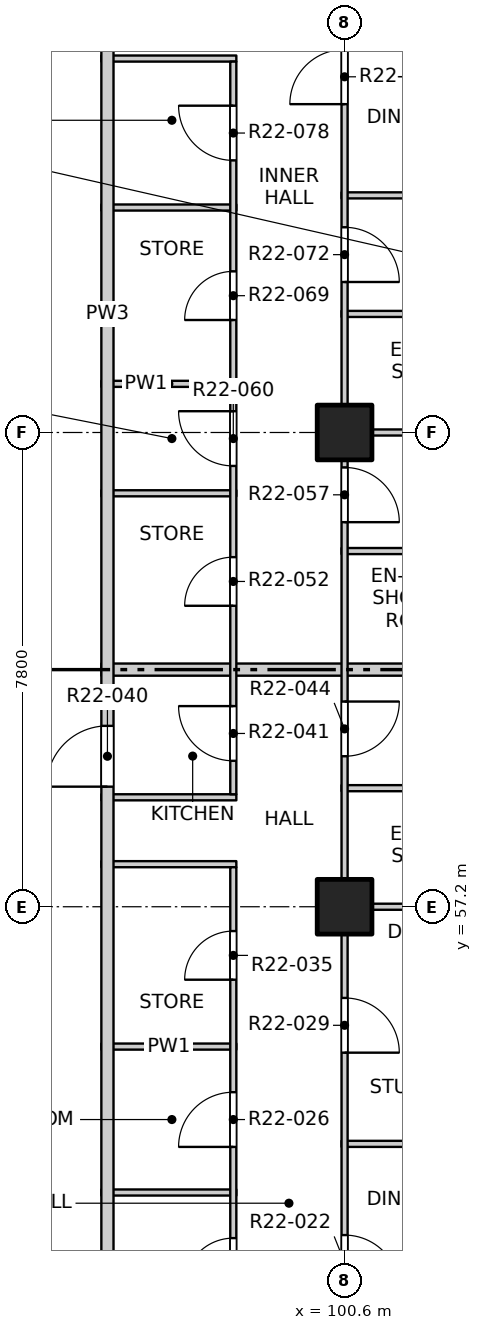
"""IFC4 building model, lengths in metres.
Left out: names, types, materials, properties, quantities, classifications, styles, units other than length and angle.
Written with IfcOpenShell. Run it as: python <this file> out.ifc"""

import sys

from ifc_helpers import new_model, si_unit, direction, frame, frame_2d, origin, origin_2d, place, context, subcontext, project, spatial, rectangle, extrude, element, fill, save


model = new_model("IFC4")
c1 = context("Model", 3, precision=1e-05, world=origin(), true_north=direction((0.0, 1.0)))
c2 = subcontext(c1, "Body", "Model", "MODEL_VIEW")
j1 = project(units=[si_unit("LENGTHUNIT", "METRE"), si_unit("PLANEANGLEUNIT", "RADIAN")], contexts=[c1])
p1 = place(None, origin())
s1 = spatial("IfcSite", under=j1, at=p1, CompositionType="ELEMENT")
p2 = place(p1, origin())
s2 = spatial("IfcBuilding", under=s1, at=p2, CompositionType="ELEMENT")
p3 = place(p2, frame((0.0, 0.0, 224.5)))
s3 = spatial("IfcBuildingStorey", under=s2, at=p3, CompositionType="ELEMENT", Elevation=224.5)
for number, where, z_axis, x_axis in (
    (1, (100.6, 57.2, -0.25), (0.0, 0.0, 1.0), (1.0, 0.0, 0.0)),
    (2, (100.6, 65.0, -0.25), (0.0, 0.0, 1.0), (1.0, 0.0, 0.0)),
):
    element("IfcColumn", number, at=place(p3, frame(where, z_axis=z_axis, x_axis=x_axis)), inside=s3, PredefinedType="COLUMN", context=c2, shape_type="SweptSolid", body=[
        extrude(rectangle(XDim=0.9, YDim=0.9, at=origin_2d()), origin(), (0.0, 0.0, 1.0), 3.4),
    ])
p4 = place(p3, frame((96.6, 52.5, 0.0), z_axis=(0.0, 0.0, 1.0), x_axis=(1.0, 0.0, 0.0)))
e3 = element("IfcWall", 3, at=p4, inside=s3, PredefinedType="PARTITIONING", context=c2, shape_type="SweptSolid", body=[
    extrude(rectangle(XDim=2.22, YDim=0.1, at=frame_2d((1.11, 0.0))), origin(), (0.0, 0.0, 1.0), 3.15),
])
p5 = place(p3, frame((100.55, 53.3, 0.0), z_axis=(0.0, 0.0, 1.0), x_axis=(1.0, 0.0, 0.0)))
e4 = element("IfcWall", 4, at=p5, inside=s3, PredefinedType="PARTITIONING", context=c2, shape_type="SweptSolid", body=[
    extrude(rectangle(XDim=7.55, YDim=0.1, at=frame_2d((3.775, 0.0))), origin(), (0.0, 0.0, 1.0), 3.15),
])
p6 = place(p3, frame((96.6, 54.9, 0.0), z_axis=(0.0, 0.0, 1.0), x_axis=(1.0, 0.0, 0.0)))
e5 = element("IfcWall", 5, at=p6, inside=s3, PredefinedType="PARTITIONING", context=c2, shape_type="SweptSolid", body=[
    extrude(rectangle(XDim=2.22, YDim=0.1, at=frame_2d((1.11, 0.0))), origin(), (0.0, 0.0, 1.0), 3.15),
])
p7 = place(p3, frame((100.55, 57.2, 0.0), z_axis=(0.0, 0.0, 1.0), x_axis=(1.0, 0.0, 0.0)))
e6 = element("IfcWall", 6, at=p7, inside=s3, PredefinedType="PARTITIONING", context=c2, shape_type="SweptSolid", body=[
    extrude(rectangle(XDim=7.55, YDim=0.1, at=frame_2d((3.775, 0.0))), origin(), (0.0, 0.0, 1.0), 3.15),
])
for number, where, z_axis, x_axis in (
    (7, (96.6, 57.9, 0.0), (0.0, 0.0, 1.0), (1.0, 0.0, 0.0)),
    (8, (96.6, 59.0, 0.0), (0.0, 0.0, 1.0), (1.0, 0.0, 0.0)),
):
    element("IfcWall", number, at=place(p3, frame(where, z_axis=z_axis, x_axis=x_axis)), inside=s3, PredefinedType="PARTITIONING", context=c2, shape_type="SweptSolid", body=[
        extrude(rectangle(XDim=2.22, YDim=0.1, at=frame_2d((1.11, 0.0))), origin(), (0.0, 0.0, 1.0), 3.15),
    ])
p8 = place(p3, frame((100.55, 59.15, 0.0), z_axis=(0.0, 0.0, 1.0), x_axis=(1.0, 0.0, 0.0)))
e9 = element("IfcWall", 9, at=p8, inside=s3, PredefinedType="PARTITIONING", context=c2, shape_type="SweptSolid", body=[
    extrude(rectangle(XDim=3.7, YDim=0.1, at=frame_2d((1.85, 0.0))), origin(), (0.0, 0.0, 1.0), 3.15),
])
p9 = place(p3, frame((96.6, 61.1, 0.0), z_axis=(0.0, 0.0, 1.0), x_axis=(1.0, 0.0, 0.0)))
e10 = element("IfcWall", 10, at=p9, inside=s3, PredefinedType="PARTITIONING", context=c2, shape_type="SweptSolid", body=[
    extrude(rectangle(XDim=11.5, YDim=0.2, at=frame_2d((5.75, 0.0))), origin(), (0.0, 0.0, 1.0), 2.55),
])
p10 = place(p3, frame((100.55, 63.05, 0.0), z_axis=(0.0, 0.0, 1.0), x_axis=(1.0, 0.0, 0.0)))
e11 = element("IfcWall", 11, at=p10, inside=s3, PredefinedType="PARTITIONING", context=c2, shape_type="SweptSolid", body=[
    extrude(rectangle(XDim=3.7, YDim=0.1, at=frame_2d((1.85, 0.0))), origin(), (0.0, 0.0, 1.0), 3.15),
])
p11 = place(p3, frame((96.6, 64.0, 0.0), z_axis=(0.0, 0.0, 1.0), x_axis=(1.0, 0.0, 0.0)))
e12 = element("IfcWall", 12, at=p11, inside=s3, PredefinedType="PARTITIONING", context=c2, shape_type="SweptSolid", body=[
    extrude(rectangle(XDim=2.22, YDim=0.1, at=frame_2d((1.11, 0.0))), origin(), (0.0, 0.0, 1.0), 3.15),
])
p12 = place(p3, frame((100.55, 65.0, 0.0), z_axis=(0.0, 0.0, 1.0), x_axis=(1.0, 0.0, 0.0)))
e13 = element("IfcWall", 13, at=p12, inside=s3, PredefinedType="PARTITIONING", context=c2, shape_type="SweptSolid", body=[
    extrude(rectangle(XDim=7.55, YDim=0.1, at=frame_2d((3.775, 0.0))), origin(), (0.0, 0.0, 1.0), 3.15),
])
p13 = place(p3, frame((96.6, 65.8, 0.0), z_axis=(0.0, 0.0, 1.0), x_axis=(1.0, 0.0, 0.0)))
e14 = element("IfcWall", 14, at=p13, inside=s3, PredefinedType="PARTITIONING", context=c2, shape_type="SweptSolid", body=[
    extrude(rectangle(XDim=2.22, YDim=0.1, at=frame_2d((1.11, 0.0))), origin(), (0.0, 0.0, 1.0), 3.15),
])
p14 = place(p3, frame((100.55, 66.95, 0.0), z_axis=(0.0, 0.0, 1.0), x_axis=(1.0, 0.0, 0.0)))
e15 = element("IfcWall", 15, at=p14, inside=s3, PredefinedType="PARTITIONING", context=c2, shape_type="SweptSolid", body=[
    extrude(rectangle(XDim=3.7, YDim=0.1, at=frame_2d((1.85, 0.0))), origin(), (0.0, 0.0, 1.0), 3.15),
])
p15 = place(p3, frame((96.6, 68.7, 0.0), z_axis=(0.0, 0.0, 1.0), x_axis=(1.0, 0.0, 0.0)))
e16 = element("IfcWall", 16, at=p15, inside=s3, PredefinedType="PARTITIONING", context=c2, shape_type="SweptSolid", body=[
    extrude(rectangle(XDim=2.22, YDim=0.1, at=frame_2d((1.11, 0.0))), origin(), (0.0, 0.0, 1.0), 2.55),
])
p16 = place(p3, frame((100.55, 68.9, 0.0), z_axis=(0.0, 0.0, 1.0), x_axis=(1.0, 0.0, 0.0)))
e17 = element("IfcWall", 17, at=p16, inside=s3, PredefinedType="PARTITIONING", context=c2, shape_type="SweptSolid", body=[
    extrude(rectangle(XDim=7.55, YDim=0.1, at=frame_2d((3.775, 0.0))), origin(), (0.0, 0.0, 1.0), 2.55),
])
p17 = place(p3, frame((96.6, 71.15, 0.0), z_axis=(0.0, 0.0, 1.0), x_axis=(1.0, 0.0, 0.0)))
e18 = element("IfcWall", 18, at=p17, inside=s3, PredefinedType="PARTITIONING", context=c2, shape_type="SweptSolid", body=[
    extrude(rectangle(XDim=2.22, YDim=0.1, at=frame_2d((1.11, 0.0))), origin(), (0.0, 0.0, 1.0), 3.15),
])
p18 = place(p3, frame((96.7, 49.5, 0.0), z_axis=(0.0, 0.0, 1.0), x_axis=(0.0, 1.0, 0.0)))
e19 = element("IfcWall", 19, at=p18, inside=s3, PredefinedType="PARTITIONING", context=c2, shape_type="SweptSolid", body=[
    extrude(rectangle(XDim=34.9, YDim=0.2, at=frame_2d((17.45, 0.0))), origin(), (0.0, 0.0, 1.0), 3.15),
])
p19 = place(p18, frame((9.675, 0.0, 0.0)))
e20 = element("IfcOpeningElement", 20, at=p19, cuts=e19, PredefinedType="OPENING", context=c2, shape_type="SweptSolid", body=[
    extrude(rectangle(XDim=1.0, YDim=2.1, at=frame_2d((0.5, 1.05))), frame((0.0, 0.11, 0.0), z_axis=(0.0, -1.0, 0.0), x_axis=(1.0, 0.0, 0.0)), (0.0, 0.0, 1.0), 0.22),
])
p20 = place(p18, frame((22.925, 0.0, 0.0)))
e21 = element("IfcOpeningElement", 21, at=p20, cuts=e19, PredefinedType="OPENING", context=c2, shape_type="SweptSolid", body=[
    extrude(rectangle(XDim=1.0, YDim=2.1, at=frame_2d((0.5, 1.05))), frame((0.0, 0.11, 0.0), z_axis=(0.0, -1.0, 0.0), x_axis=(1.0, 0.0, 0.0)), (0.0, 0.0, 1.0), 0.22),
])
p21 = place(p18, frame((33.025, 0.0, 0.0)))
e22 = element("IfcOpeningElement", 22, at=p21, cuts=e19, PredefinedType="OPENING", context=c2, shape_type="SweptSolid", body=[
    extrude(rectangle(XDim=1.0, YDim=2.1, at=frame_2d((0.5, 1.05))), frame((0.0, 0.11, 0.0), z_axis=(0.0, -1.0, 0.0), x_axis=(1.0, 0.0, 0.0)), (0.0, 0.0, 1.0), 0.22),
])
p22 = place(p3, frame((98.77, 45.55, 0.0), z_axis=(0.0, 0.0, 1.0), x_axis=(0.0, 1.0, 0.0)))
e23 = element("IfcWall", 23, at=p22, inside=s3, PredefinedType="PARTITIONING", context=c2, shape_type="SweptSolid", body=[
    extrude(rectangle(XDim=12.3, YDim=0.1, at=frame_2d((6.15, 0.0))), origin(), (0.0, 0.0, 1.0), 3.15),
])
p23 = place(p22, frame((0.4, 0.0, 0.0)))
e24 = element("IfcOpeningElement", 24, at=p23, cuts=e23, PredefinedType="OPENING", context=c2, shape_type="SweptSolid", body=[
    extrude(rectangle(XDim=0.9, YDim=2.1, at=frame_2d((0.45, 1.05))), frame((0.0, 0.06, 0.0), z_axis=(0.0, -1.0, 0.0), x_axis=(1.0, 0.0, 0.0)), (0.0, 0.0, 1.0), 0.12),
])
p24 = place(p22, frame((2.8, 0.0, 0.0)))
e25 = element("IfcOpeningElement", 25, at=p24, cuts=e23, PredefinedType="OPENING", context=c2, shape_type="SweptSolid", body=[
    extrude(rectangle(XDim=0.8, YDim=2.1, at=frame_2d((0.4, 1.05))), frame((0.0, 0.06, 0.0), z_axis=(0.0, -1.0, 0.0), x_axis=(1.0, 0.0, 0.0)), (0.0, 0.0, 1.0), 0.12),
])
p25 = place(p22, frame((5.4, 0.0, 0.0)))
e26 = element("IfcOpeningElement", 26, at=p25, cuts=e23, PredefinedType="OPENING", context=c2, shape_type="SweptSolid", body=[
    extrude(rectangle(XDim=0.8, YDim=2.1, at=frame_2d((0.4, 1.05))), frame((0.0, 0.06, 0.0), z_axis=(0.0, -1.0, 0.0), x_axis=(1.0, 0.0, 0.0)), (0.0, 0.0, 1.0), 0.12),
])
p26 = place(p22, frame((7.7, 0.0, 0.0)))
e27 = element("IfcOpeningElement", 27, at=p26, cuts=e23, PredefinedType="OPENING", context=c2, shape_type="SweptSolid", body=[
    extrude(rectangle(XDim=0.9, YDim=2.1, at=frame_2d((0.45, 1.05))), frame((0.0, 0.06, 0.0), z_axis=(0.0, -1.0, 0.0), x_axis=(1.0, 0.0, 0.0)), (0.0, 0.0, 1.0), 0.12),
])
p27 = place(p22, frame((10.45, 0.0, 0.0)))
e28 = element("IfcOpeningElement", 28, at=p27, cuts=e23, PredefinedType="OPENING", context=c2, shape_type="SweptSolid", body=[
    extrude(rectangle(XDim=0.8, YDim=2.1, at=frame_2d((0.4, 1.05))), frame((0.0, 0.06, 0.0), z_axis=(0.0, -1.0, 0.0), x_axis=(1.0, 0.0, 0.0)), (0.0, 0.0, 1.0), 0.12),
])
p28 = place(p3, frame((98.77, 59.05, 0.0), z_axis=(0.0, 0.0, 1.0), x_axis=(0.0, 1.0, 0.0)))
e29 = element("IfcWall", 29, at=p28, inside=s3, PredefinedType="PARTITIONING", context=c2, shape_type="SweptSolid", body=[
    extrude(rectangle(XDim=12.05, YDim=0.1, at=frame_2d((6.025, 0.0))), origin(), (0.0, 0.0, 1.0), 3.15),
])
p29 = place(p28, frame((0.55, 0.0, 0.0)))
e30 = element("IfcOpeningElement", 30, at=p29, cuts=e29, PredefinedType="OPENING", context=c2, shape_type="SweptSolid", body=[
    extrude(rectangle(XDim=0.9, YDim=2.1, at=frame_2d((0.45, 1.05))), frame((0.0, 0.06, 0.0), z_axis=(0.0, -1.0, 0.0), x_axis=(1.0, 0.0, 0.0)), (0.0, 0.0, 1.0), 0.12),
])
p30 = place(p28, frame((3.1, 0.0, 0.0)))
e31 = element("IfcOpeningElement", 31, at=p30, cuts=e29, PredefinedType="OPENING", context=c2, shape_type="SweptSolid", body=[
    extrude(rectangle(XDim=0.8, YDim=2.1, at=frame_2d((0.4, 1.05))), frame((0.0, 0.06, 0.0), z_axis=(0.0, -1.0, 0.0), x_axis=(1.0, 0.0, 0.0)), (0.0, 0.0, 1.0), 0.12),
])
p31 = place(p28, frame((5.4, 0.0, 0.0)))
e32 = element("IfcOpeningElement", 32, at=p31, cuts=e29, PredefinedType="OPENING", context=c2, shape_type="SweptSolid", body=[
    extrude(rectangle(XDim=0.9, YDim=2.1, at=frame_2d((0.45, 1.05))), frame((0.0, 0.06, 0.0), z_axis=(0.0, -1.0, 0.0), x_axis=(1.0, 0.0, 0.0)), (0.0, 0.0, 1.0), 0.12),
])
p32 = place(p28, frame((7.8, 0.0, 0.0)))
e33 = element("IfcOpeningElement", 33, at=p32, cuts=e29, PredefinedType="OPENING", context=c2, shape_type="SweptSolid", body=[
    extrude(rectangle(XDim=0.8, YDim=2.1, at=frame_2d((0.4, 1.05))), frame((0.0, 0.06, 0.0), z_axis=(0.0, -1.0, 0.0), x_axis=(1.0, 0.0, 0.0)), (0.0, 0.0, 1.0), 0.12),
])
p33 = place(p28, frame((10.425, 0.0, 0.0)))
e34 = element("IfcOpeningElement", 34, at=p33, cuts=e29, PredefinedType="OPENING", context=c2, shape_type="SweptSolid", body=[
    extrude(rectangle(XDim=0.9, YDim=2.1, at=frame_2d((0.45, 1.05))), frame((0.0, 0.06, 0.0), z_axis=(0.0, -1.0, 0.0), x_axis=(1.0, 0.0, 0.0)), (0.0, 0.0, 1.0), 0.12),
])
p34 = place(p3, frame((100.6, 41.9, 0.0), z_axis=(0.0, 0.0, 1.0), x_axis=(0.0, 1.0, 0.0)))
e35 = element("IfcWall", 35, at=p34, inside=s3, PredefinedType="PARTITIONING", context=c2, shape_type="SweptSolid", body=[
    extrude(rectangle(XDim=46.2, YDim=0.1, at=frame_2d((23.1, 0.0))), origin(), (0.0, 0.0, 1.0), 3.15),
])
p35 = place(p34, frame((1.2, 0.0, 0.0)))
e36 = element("IfcOpeningElement", 36, at=p35, cuts=e35, PredefinedType="OPENING", context=c2, shape_type="SweptSolid", body=[
    extrude(rectangle(XDim=0.9, YDim=2.1, at=frame_2d((0.45, 1.05))), frame((0.0, 0.06, 0.0), z_axis=(0.0, -1.0, 0.0), x_axis=(1.0, 0.0, 0.0)), (0.0, 0.0, 1.0), 0.12),
])
p36 = place(p34, frame((6.025, 0.0, 0.0)))
e37 = element("IfcOpeningElement", 37, at=p36, cuts=e35, PredefinedType="OPENING", context=c2, shape_type="SweptSolid", body=[
    extrude(rectangle(XDim=0.9, YDim=2.1, at=frame_2d((0.45, 1.05))), frame((0.0, 0.06, 0.0), z_axis=(0.0, -1.0, 0.0), x_axis=(1.0, 0.0, 0.0)), (0.0, 0.0, 1.0), 0.12),
])
p37 = place(p34, frame((9.0, 0.0, 0.0)))
e38 = element("IfcOpeningElement", 38, at=p37, cuts=e35, PredefinedType="OPENING", context=c2, shape_type="SweptSolid", body=[
    extrude(rectangle(XDim=0.9, YDim=2.1, at=frame_2d((0.45, 1.05))), frame((0.0, 0.06, 0.0), z_axis=(0.0, -1.0, 0.0), x_axis=(1.0, 0.0, 0.0)), (0.0, 0.0, 1.0), 0.12),
])
p38 = place(p34, frame((12.9, 0.0, 0.0)))
e39 = element("IfcOpeningElement", 39, at=p38, cuts=e35, PredefinedType="OPENING", context=c2, shape_type="SweptSolid", body=[
    extrude(rectangle(XDim=0.9, YDim=2.1, at=frame_2d((0.45, 1.05))), frame((0.0, 0.06, 0.0), z_axis=(0.0, -1.0, 0.0), x_axis=(1.0, 0.0, 0.0)), (0.0, 0.0, 1.0), 0.12),
])
p39 = place(p34, frame((17.775, 0.0, 0.0)))
e40 = element("IfcOpeningElement", 40, at=p39, cuts=e35, PredefinedType="OPENING", context=c2, shape_type="SweptSolid", body=[
    extrude(rectangle(XDim=0.9, YDim=2.1, at=frame_2d((0.45, 1.05))), frame((0.0, 0.06, 0.0), z_axis=(0.0, -1.0, 0.0), x_axis=(1.0, 0.0, 0.0)), (0.0, 0.0, 1.0), 0.12),
])
p40 = place(p34, frame((21.625, 0.0, 0.0)))
e41 = element("IfcOpeningElement", 41, at=p40, cuts=e35, PredefinedType="OPENING", context=c2, shape_type="SweptSolid", body=[
    extrude(rectangle(XDim=0.9, YDim=2.1, at=frame_2d((0.45, 1.05))), frame((0.0, 0.06, 0.0), z_axis=(0.0, -1.0, 0.0), x_axis=(1.0, 0.0, 0.0)), (0.0, 0.0, 1.0), 0.12),
])
p41 = place(p34, frame((25.575, 0.0, 0.0)))
e42 = element("IfcOpeningElement", 42, at=p41, cuts=e35, PredefinedType="OPENING", context=c2, shape_type="SweptSolid", body=[
    extrude(rectangle(XDim=0.9, YDim=2.1, at=frame_2d((0.45, 1.05))), frame((0.0, 0.06, 0.0), z_axis=(0.0, -1.0, 0.0), x_axis=(1.0, 0.0, 0.0)), (0.0, 0.0, 1.0), 0.12),
])
p42 = place(p34, frame((28.5, 0.0, 0.0)))
e43 = element("IfcOpeningElement", 43, at=p42, cuts=e35, PredefinedType="OPENING", context=c2, shape_type="SweptSolid", body=[
    extrude(rectangle(XDim=0.9, YDim=2.1, at=frame_2d((0.45, 1.05))), frame((0.0, 0.06, 0.0), z_axis=(0.0, -1.0, 0.0), x_axis=(1.0, 0.0, 0.0)), (0.0, 0.0, 1.0), 0.12),
])
p43 = place(p34, frame((33.375, 0.0, 0.0)))
e44 = element("IfcOpeningElement", 44, at=p43, cuts=e35, PredefinedType="OPENING", context=c2, shape_type="SweptSolid", body=[
    extrude(rectangle(XDim=0.9, YDim=2.1, at=frame_2d((0.45, 1.05))), frame((0.0, 0.06, 0.0), z_axis=(0.0, -1.0, 0.0), x_axis=(1.0, 0.0, 0.0)), (0.0, 0.0, 1.0), 0.12),
])
p44 = place(p34, frame((36.3, 0.0, 0.0)))
e45 = element("IfcOpeningElement", 45, at=p44, cuts=e35, PredefinedType="OPENING", context=c2, shape_type="SweptSolid", body=[
    extrude(rectangle(XDim=0.9, YDim=2.1, at=frame_2d((0.45, 1.05))), frame((0.0, 0.06, 0.0), z_axis=(0.0, -1.0, 0.0), x_axis=(1.0, 0.0, 0.0)), (0.0, 0.0, 1.0), 0.12),
])
p45 = place(p34, frame((40.2, 0.0, 0.0)))
e46 = element("IfcOpeningElement", 46, at=p45, cuts=e35, PredefinedType="OPENING", context=c2, shape_type="SweptSolid", body=[
    extrude(rectangle(XDim=0.9, YDim=2.1, at=frame_2d((0.45, 1.05))), frame((0.0, 0.06, 0.0), z_axis=(0.0, -1.0, 0.0), x_axis=(1.0, 0.0, 0.0)), (0.0, 0.0, 1.0), 0.12),
])
p46 = place(p34, frame((44.1, 0.0, 0.0)))
e47 = element("IfcOpeningElement", 47, at=p46, cuts=e35, PredefinedType="OPENING", context=c2, shape_type="SweptSolid", body=[
    extrude(rectangle(XDim=0.9, YDim=2.1, at=frame_2d((0.45, 1.05))), frame((0.0, 0.06, 0.0), z_axis=(0.0, -1.0, 0.0), x_axis=(1.0, 0.0, 0.0)), (0.0, 0.0, 1.0), 0.12),
])
p47 = place(p25, origin())
e48 = element("IfcDoor", 48, at=p47, inside=s3, OperationType="SINGLE_SWING_LEFT", PredefinedType="DOOR", context=c2, shape_type="SweptSolid", body=[
    extrude(rectangle(XDim=0.8, YDim=2.1, at=frame_2d((0.4, 1.05))), frame((0.0, 0.025, 0.0), z_axis=(0.0, -1.0, 0.0), x_axis=(1.0, 0.0, 0.0)), (0.0, 0.0, 1.0), 0.05),
])
fill(e26, e48)
p48 = place(p37, origin())
e49 = element("IfcDoor", 49, at=p48, inside=s3, OperationType="SINGLE_SWING_RIGHT", PredefinedType="DOOR", context=c2, shape_type="SweptSolid", body=[
    extrude(rectangle(XDim=0.9, YDim=2.1, at=frame_2d((0.45, 1.05))), frame((0.0, 0.025, 0.0), z_axis=(0.0, -1.0, 0.0), x_axis=(1.0, 0.0, 0.0)), (0.0, 0.0, 1.0), 0.05),
])
fill(e38, e49)
p49 = place(p26, origin())
e50 = element("IfcDoor", 50, at=p49, inside=s3, OperationType="SINGLE_SWING_LEFT", PredefinedType="DOOR", context=c2, shape_type="SweptSolid", body=[
    extrude(rectangle(XDim=0.9, YDim=2.1, at=frame_2d((0.45, 1.05))), frame((0.0, 0.025, 0.0), z_axis=(0.0, -1.0, 0.0), x_axis=(1.0, 0.0, 0.0)), (0.0, 0.0, 1.0), 0.05),
])
fill(e27, e50)
p50 = place(p38, origin())
e51 = element("IfcDoor", 51, at=p50, inside=s3, OperationType="SINGLE_SWING_RIGHT", PredefinedType="DOOR", context=c2, shape_type="SweptSolid", body=[
    extrude(rectangle(XDim=0.9, YDim=2.1, at=frame_2d((0.45, 1.05))), frame((0.0, 0.025, 0.0), z_axis=(0.0, -1.0, 0.0), x_axis=(1.0, 0.0, 0.0)), (0.0, 0.0, 1.0), 0.05),
])
fill(e39, e51)
p51 = place(p27, origin())
e52 = element("IfcDoor", 52, at=p51, inside=s3, OperationType="SINGLE_SWING_LEFT", PredefinedType="DOOR", context=c2, shape_type="SweptSolid", body=[
    extrude(rectangle(XDim=0.8, YDim=2.1, at=frame_2d((0.4, 1.05))), frame((0.0, 0.025, 0.0), z_axis=(0.0, -1.0, 0.0), x_axis=(1.0, 0.0, 0.0)), (0.0, 0.0, 1.0), 0.05),
])
fill(e28, e52)
p52 = place(p19, origin())
e53 = element("IfcDoor", 53, at=p52, inside=s3, OperationType="SINGLE_SWING_LEFT", PredefinedType="DOOR", context=c2, shape_type="SweptSolid", body=[
    extrude(rectangle(XDim=1.0, YDim=2.1, at=frame_2d((0.5, 1.05))), frame((0.0, 0.025, 0.0), z_axis=(0.0, -1.0, 0.0), x_axis=(1.0, 0.0, 0.0)), (0.0, 0.0, 1.0), 0.05),
])
fill(e20, e53)
p53 = place(p29, origin())
e54 = element("IfcDoor", 54, at=p53, inside=s3, OperationType="SINGLE_SWING_RIGHT", PredefinedType="DOOR", context=c2, shape_type="SweptSolid", body=[
    extrude(rectangle(XDim=0.9, YDim=2.1, at=frame_2d((0.45, 1.05))), frame((0.0, 0.025, 0.0), z_axis=(0.0, -1.0, 0.0), x_axis=(1.0, 0.0, 0.0)), (0.0, 0.0, 1.0), 0.05),
])
fill(e30, e54)
p54 = place(p39, origin())
e55 = element("IfcDoor", 55, at=p54, inside=s3, OperationType="SINGLE_SWING_LEFT", PredefinedType="DOOR", context=c2, shape_type="SweptSolid", body=[
    extrude(rectangle(XDim=0.9, YDim=2.1, at=frame_2d((0.45, 1.05))), frame((0.0, 0.025, 0.0), z_axis=(0.0, -1.0, 0.0), x_axis=(1.0, 0.0, 0.0)), (0.0, 0.0, 1.0), 0.05),
])
fill(e40, e55)
p55 = place(p30, origin())
e56 = element("IfcDoor", 56, at=p55, inside=s3, OperationType="SINGLE_SWING_LEFT", PredefinedType="DOOR", context=c2, shape_type="SweptSolid", body=[
    extrude(rectangle(XDim=0.8, YDim=2.1, at=frame_2d((0.4, 1.05))), frame((0.0, 0.025, 0.0), z_axis=(0.0, -1.0, 0.0), x_axis=(1.0, 0.0, 0.0)), (0.0, 0.0, 1.0), 0.05),
])
fill(e31, e56)
p56 = place(p40, origin())
e57 = element("IfcDoor", 57, at=p56, inside=s3, OperationType="SINGLE_SWING_RIGHT", PredefinedType="DOOR", context=c2, shape_type="SweptSolid", body=[
    extrude(rectangle(XDim=0.9, YDim=2.1, at=frame_2d((0.45, 1.05))), frame((0.0, 0.025, 0.0), z_axis=(0.0, -1.0, 0.0), x_axis=(1.0, 0.0, 0.0)), (0.0, 0.0, 1.0), 0.05),
])
fill(e41, e57)
p57 = place(p31, origin())
e58 = element("IfcDoor", 58, at=p57, inside=s3, OperationType="SINGLE_SWING_RIGHT", PredefinedType="DOOR", context=c2, shape_type="SweptSolid", body=[
    extrude(rectangle(XDim=0.9, YDim=2.1, at=frame_2d((0.45, 1.05))), frame((0.0, 0.025, 0.0), z_axis=(0.0, -1.0, 0.0), x_axis=(1.0, 0.0, 0.0)), (0.0, 0.0, 1.0), 0.05),
])
fill(e32, e58)
p58 = place(p32, origin())
e59 = element("IfcDoor", 59, at=p58, inside=s3, OperationType="SINGLE_SWING_LEFT", PredefinedType="DOOR", context=c2, shape_type="SweptSolid", body=[
    extrude(rectangle(XDim=0.8, YDim=2.1, at=frame_2d((0.4, 1.05))), frame((0.0, 0.025, 0.0), z_axis=(0.0, -1.0, 0.0), x_axis=(1.0, 0.0, 0.0)), (0.0, 0.0, 1.0), 0.05),
])
fill(e33, e59)
p59 = place(p41, origin())
e60 = element("IfcDoor", 60, at=p59, inside=s3, OperationType="SINGLE_SWING_RIGHT", PredefinedType="DOOR", context=c2, shape_type="SweptSolid", body=[
    extrude(rectangle(XDim=0.9, YDim=2.1, at=frame_2d((0.45, 1.05))), frame((0.0, 0.025, 0.0), z_axis=(0.0, -1.0, 0.0), x_axis=(1.0, 0.0, 0.0)), (0.0, 0.0, 1.0), 0.05),
])
fill(e42, e60)
p60 = place(p33, origin())
e61 = element("IfcDoor", 61, at=p60, inside=s3, OperationType="SINGLE_SWING_RIGHT", PredefinedType="DOOR", context=c2, shape_type="SweptSolid", body=[
    extrude(rectangle(XDim=0.9, YDim=2.1, at=frame_2d((0.45, 1.05))), frame((0.0, 0.025, 0.0), z_axis=(0.0, -1.0, 0.0), x_axis=(1.0, 0.0, 0.0)), (0.0, 0.0, 1.0), 0.05),
])
fill(e34, e61)
p61 = place(p42, origin())
e62 = element("IfcDoor", 62, at=p61, inside=s3, OperationType="SINGLE_SWING_LEFT", PredefinedType="DOOR", context=c2, shape_type="SweptSolid", body=[
    extrude(rectangle(XDim=0.9, YDim=2.1, at=frame_2d((0.45, 1.05))), frame((0.0, 0.025, 0.0), z_axis=(0.0, -1.0, 0.0), x_axis=(1.0, 0.0, 0.0)), (0.0, 0.0, 1.0), 0.05),
])
fill(e43, e62)
save(model, sys.argv[1])
